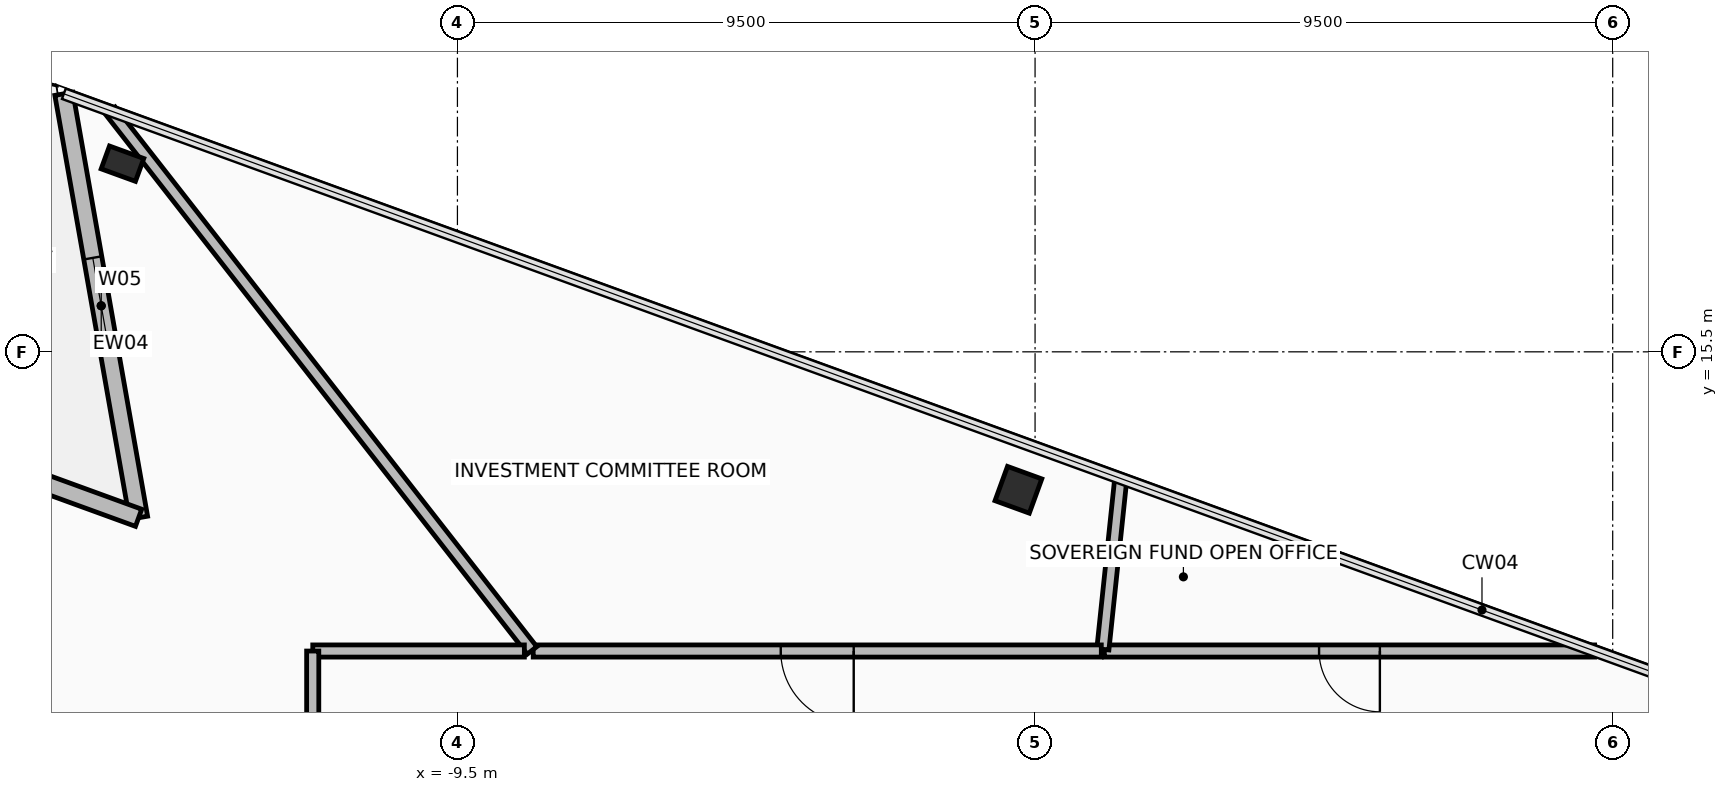
"""IFC4 building model, lengths in metres.
Left out: names, types, materials, properties, quantities, classifications, styles, units other than length and angle.
Written with IfcOpenShell. Run it as: python <this file> out.ifc"""

import sys

from ifc_helpers import new_model, si_unit, direction, frame, frame_2d, origin, origin_2d, place, context, subcontext, project, spatial, rectangle, hollow_rectangle, extrude, element, fill, save


model = new_model("IFC4")
c1 = context("Model", 3, precision=1e-05, world=origin(), true_north=direction((0.0, 1.0)))
c2 = subcontext(c1, "Body", "Model", "MODEL_VIEW")
j1 = project(units=[si_unit("LENGTHUNIT", "METRE"), si_unit("PLANEANGLEUNIT", "RADIAN")], contexts=[c1])
p1 = place(None, origin())
s1 = spatial("IfcSite", under=j1, at=p1, CompositionType="ELEMENT")
p2 = place(p1, origin())
s2 = spatial("IfcBuilding", under=s1, at=p2, CompositionType="ELEMENT")
p3 = place(p2, frame((0.0, 0.0, 170.5)))
s3 = spatial("IfcBuildingStorey", under=s2, at=p3, CompositionType="ELEMENT", Elevation=170.5)
p4 = place(p3, frame((-0.274, 13.231, 0.0), z_axis=(0.0, 0.0, 1.0), x_axis=(-0.939692023847, 0.342021783398, 0.0)))
e1 = element("IfcColumn", 1, at=p4, inside=s3, PredefinedType="COLUMN", context=c2, shape_type="SweptSolid", body=[
    extrude(hollow_rectangle(XDim=0.6, YDim=0.6, WallThickness=0.036, at=origin_2d()), origin(), (0.0, 0.0, 1.0), 3.6),
])
p5 = place(p3, frame((-15.009, 18.594, 0.0), z_axis=(0.0, 0.0, 1.0), x_axis=(-0.939692023847, 0.342021783398, 0.0)))
e2 = element("IfcColumn", 2, at=p5, inside=s3, PredefinedType="COLUMN", context=c2, shape_type="SweptSolid", body=[
    extrude(hollow_rectangle(XDim=0.4, YDim=0.6, WallThickness=0.03, at=origin_2d()), origin(), (0.0, 0.0, 1.0), 3.6),
])
p6 = place(p3, frame((-15.973, 19.743, 0.0), z_axis=(0.0, 0.0, 1.0), x_axis=(0.173651569749, -0.984807154891, 0.0)))
e3 = element("IfcWall", 3, at=p6, inside=s3, PredefinedType="STANDARD", context=c2, shape_type="SweptSolid", body=[
    extrude(rectangle(XDim=7.08, YDim=0.3, at=frame_2d((3.54, 0.0))), origin(), (0.0, 0.0, 1.0), 2.715),
])
p7 = place(p6, frame((2.74, 0.0, 0.335)))
e4 = element("IfcOpeningElement", 4, at=p7, cuts=e3, PredefinedType="OPENING", context=c2, shape_type="SweptSolid", body=[
    extrude(rectangle(XDim=1.6, YDim=2.2, at=frame_2d((0.8, 1.1))), frame((0.0, 0.16, 0.0), z_axis=(0.0, -1.0, 0.0), x_axis=(1.0, 0.0, 0.0)), (0.0, 0.0, 1.0), 0.32),
])
p8 = place(p3, frame((-14.744, 12.771, 0.0), z_axis=(0.0, 0.0, 1.0), x_axis=(-0.939687665182, 0.342033758429, 0.0)))
e5 = element("IfcWall", 5, at=p8, inside=s3, PredefinedType="STANDARD", context=c2, shape_type="SweptSolid", body=[
    extrude(rectangle(XDim=7.08, YDim=0.3, at=frame_2d((3.54, 0.0))), origin(), (0.0, 0.0, 1.0), 2.715),
])
p9 = place(p8, frame((2.608, 0.0, 0.0)))
e6 = element("IfcOpeningElement", 6, at=p9, cuts=e5, PredefinedType="OPENING", context=c2, shape_type="SweptSolid", body=[
    extrude(rectangle(XDim=1.1, YDim=2.2, at=frame_2d((0.55, 1.1))), frame((0.0, 0.16, 0.0), z_axis=(0.0, -1.0, 0.0), x_axis=(1.0, 0.0, 0.0)), (0.0, 0.0, 1.0), 0.32),
])
p10 = place(p3, frame((9.203, 10.58, 0.0), z_axis=(0.0, 0.0, 1.0), x_axis=(-1.0, 0.0, 0.0)))
e7 = element("IfcWall", 7, at=p10, inside=s3, PredefinedType="PARTITIONING", context=c2, shape_type="SweptSolid", body=[
    extrude(rectangle(XDim=8.063, YDim=0.2, at=frame_2d((4.031, 0.0))), origin(), (0.0, 0.0, 1.0), 2.715),
])
p11 = place(p10, frame((3.532, 0.0, 0.0)))
e8 = element("IfcOpeningElement", 8, at=p11, cuts=e7, PredefinedType="OPENING", context=c2, shape_type="SweptSolid", body=[
    extrude(rectangle(XDim=1.0, YDim=2.15, at=frame_2d((0.5, 1.075))), frame((0.0, 0.11, 0.0), z_axis=(0.0, -1.0, 0.0), x_axis=(1.0, 0.0, 0.0)), (0.0, 0.0, 1.0), 0.22),
])
p12 = place(p3, frame((1.115, 10.608, 0.0), z_axis=(0.0, 0.0, 1.0), x_axis=(0.10451827762, 0.99452296587, 0.0)))
e9 = element("IfcWall", 9, at=p12, inside=s3, PredefinedType="PARTITIONING", context=c2, shape_type="SweptSolid", body=[
    extrude(rectangle(XDim=2.824, YDim=0.2, at=frame_2d((1.412, 0.0))), origin(), (0.0, 0.0, 1.0), 2.715),
])
p13 = place(p3, frame((1.09, 10.58, 0.0), z_axis=(0.0, 0.0, 1.0), x_axis=(-1.0, 0.0, 0.0)))
e10 = element("IfcWall", 10, at=p13, inside=s3, PredefinedType="PARTITIONING", context=c2, shape_type="SweptSolid", body=[
    extrude(rectangle(XDim=9.344, YDim=0.2, at=frame_2d((4.672, 0.0))), origin(), (0.0, 0.0, 1.0), 3.055),
])
p14 = place(p13, frame((4.072, 0.0, 0.0)))
e11 = element("IfcOpeningElement", 11, at=p14, cuts=e10, PredefinedType="OPENING", context=c2, shape_type="SweptSolid", body=[
    extrude(rectangle(XDim=1.2, YDim=2.15, at=frame_2d((0.6, 1.075))), frame((0.0, 0.11, 0.0), z_axis=(0.0, -1.0, 0.0), x_axis=(1.0, 0.0, 0.0)), (0.0, 0.0, 1.0), 0.22),
])
p15 = place(p3, frame((-8.273, 10.59, 0.0), z_axis=(0.0, 0.0, 1.0), x_axis=(-0.61567096372, 0.788003340369, 0.0)))
e12 = element("IfcWall", 12, at=p15, inside=s3, PredefinedType="PARTITIONING", context=c2, shape_type="SweptSolid", body=[
    extrude(rectangle(XDim=11.263, YDim=0.2, at=frame_2d((5.631, 0.0))), origin(), (0.0, 0.0, 1.0), 2.715),
])
p16 = place(p3, frame((-8.399, 10.58, 0.0), z_axis=(0.0, 0.0, 1.0), x_axis=(-1.0, 0.0, 0.0)))
e13 = element("IfcWall", 13, at=p16, inside=s3, PredefinedType="PARTITIONING", context=c2, shape_type="SweptSolid", body=[
    extrude(rectangle(XDim=3.48, YDim=0.2, at=frame_2d((1.74, 0.0))), origin(), (0.0, 0.0, 1.0), 2.765),
])
p17 = place(p3, frame((-11.88, 10.579, 0.0), z_axis=(0.0, 0.0, 1.0), x_axis=(0.0, -1.0, 0.0)))
e14 = element("IfcWall", 14, at=p17, inside=s3, PredefinedType="PARTITIONING", context=c2, shape_type="SweptSolid", body=[
    extrude(rectangle(XDim=8.881, YDim=0.2, at=frame_2d((4.44, 0.0))), origin(), (0.0, 0.0, 1.0), 2.765),
])
p18 = place(p17, frame((3.941, 0.0, 0.0)))
e15 = element("IfcOpeningElement", 15, at=p18, cuts=e14, PredefinedType="OPENING", context=c2, shape_type="SweptSolid", body=[
    extrude(rectangle(XDim=1.0, YDim=2.15, at=frame_2d((0.5, 1.075))), frame((0.0, 0.11, 0.0), z_axis=(0.0, -1.0, 0.0), x_axis=(1.0, 0.0, 0.0)), (0.0, 0.0, 1.0), 0.22),
])
p19 = place(p7, origin())
e16 = element("IfcWindow", 16, at=p19, inside=s3, PartitioningType="SINGLE_PANEL", PredefinedType="WINDOW", context=c2, shape_type="SweptSolid", body=[
    extrude(rectangle(XDim=1.6, YDim=2.2, at=frame_2d((0.8, 1.1))), frame((0.0, 0.03, 0.0), z_axis=(0.0, -1.0, 0.0), x_axis=(1.0, 0.0, 0.0)), (0.0, 0.0, 1.0), 0.06),
])
fill(e4, e16)
p20 = place(p11, origin())
e17 = element("IfcDoor", 17, at=p20, inside=s3, OperationType="SINGLE_SWING_RIGHT", PredefinedType="DOOR", context=c2, shape_type="SweptSolid", body=[
    extrude(rectangle(XDim=1.0, YDim=2.15, at=frame_2d((0.5, 1.075))), frame((0.0, 0.025, 0.0), z_axis=(0.0, -1.0, 0.0), x_axis=(1.0, 0.0, 0.0)), (0.0, 0.0, 1.0), 0.05),
])
fill(e8, e17)
p21 = place(p14, origin())
e18 = element("IfcDoor", 18, at=p21, inside=s3, OperationType="SINGLE_SWING_LEFT", PredefinedType="DOOR", context=c2, shape_type="SweptSolid", body=[
    extrude(rectangle(XDim=1.2, YDim=2.15, at=frame_2d((0.6, 1.075))), frame((0.0, 0.025, 0.0), z_axis=(0.0, -1.0, 0.0), x_axis=(1.0, 0.0, 0.0)), (0.0, 0.0, 1.0), 0.05),
])
fill(e11, e18)
save(model, sys.argv[1])
